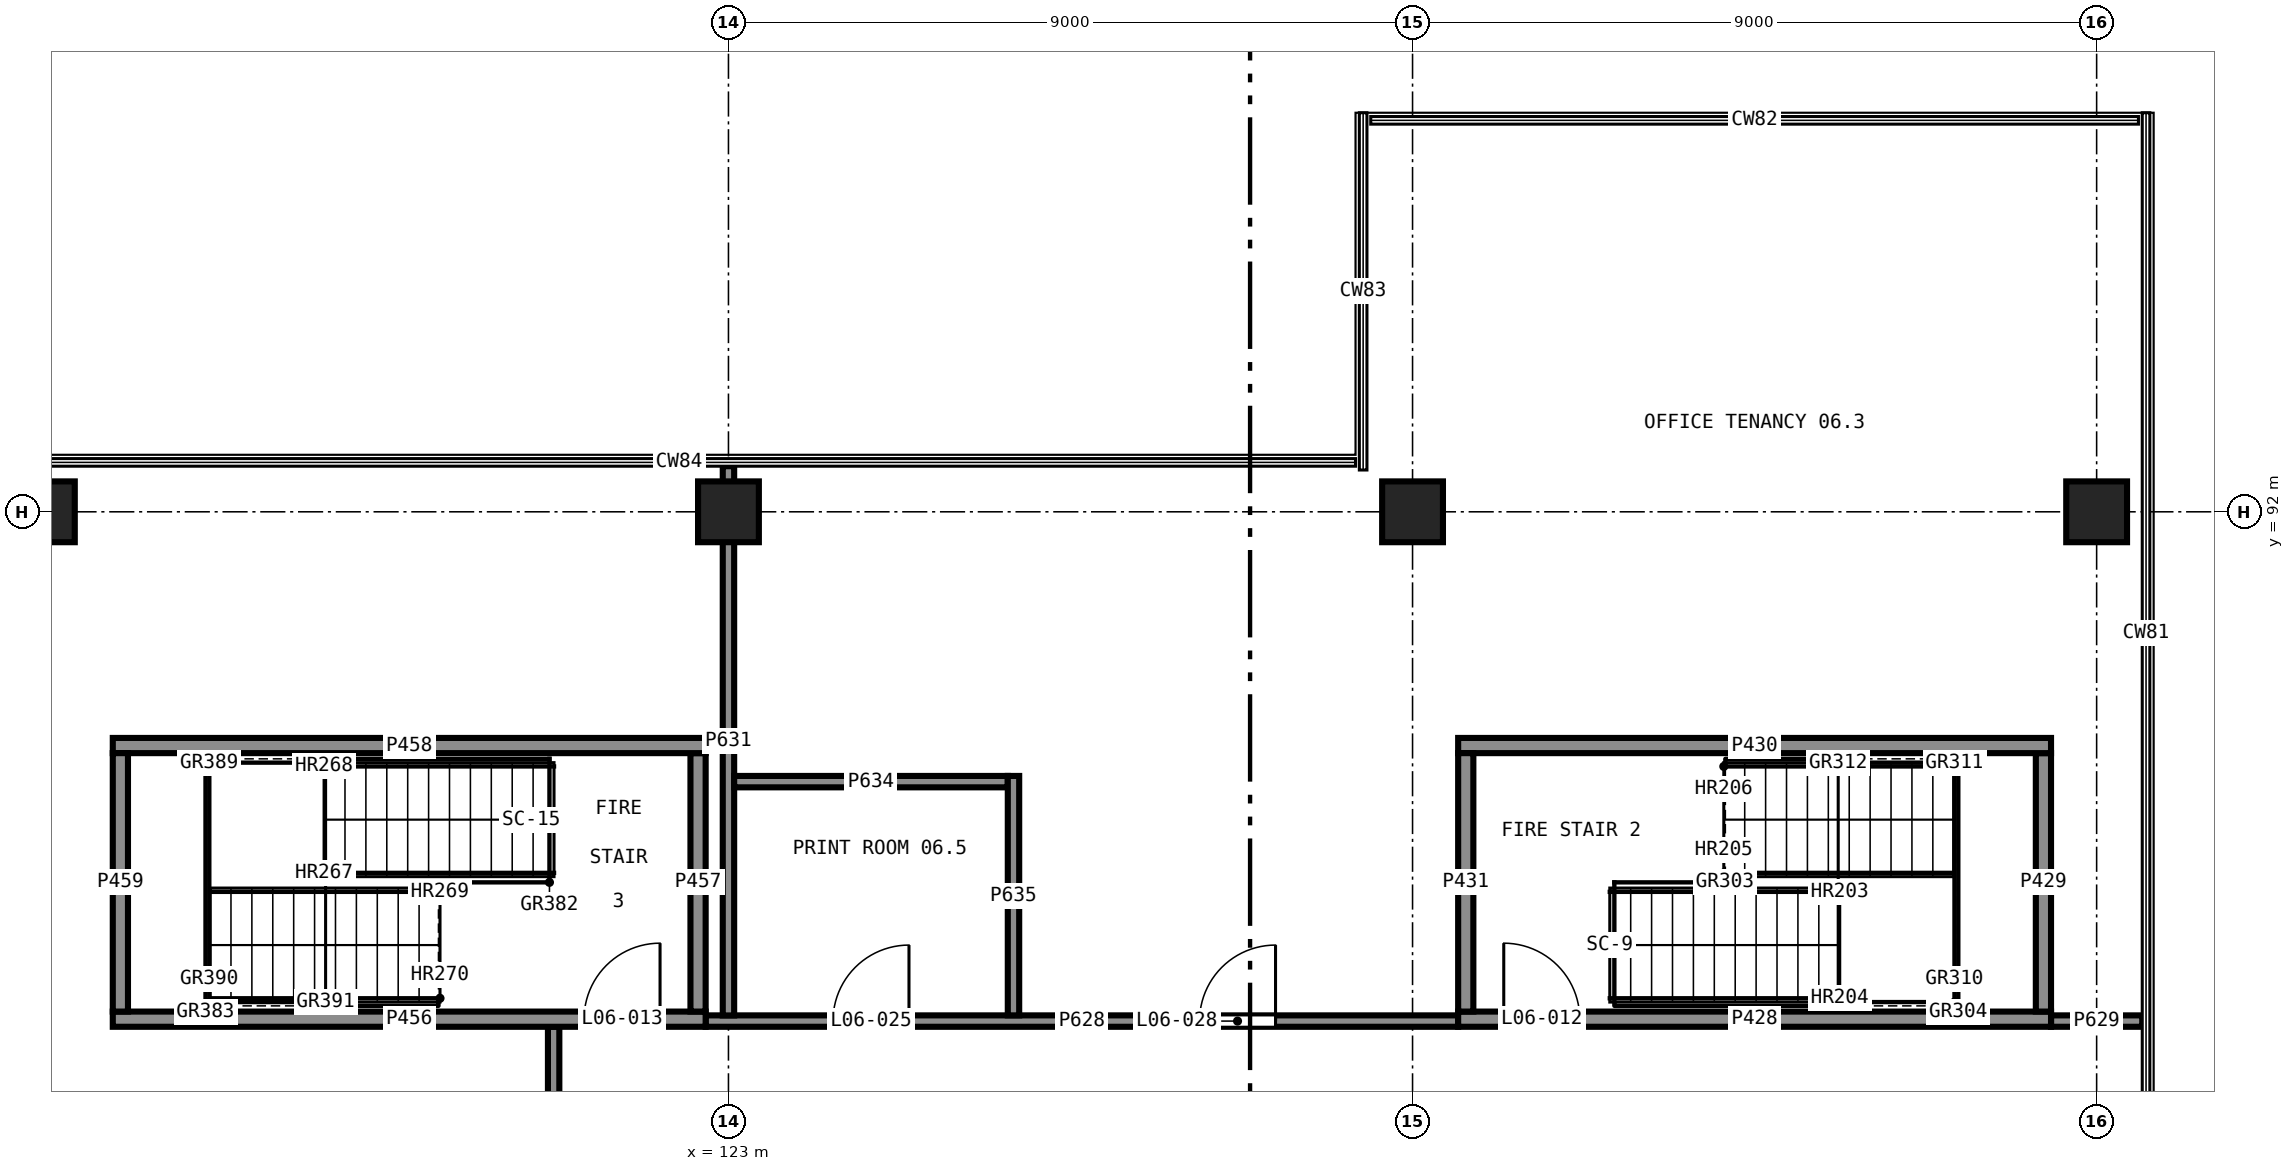
"""IFC4 building model, lengths in metres.
Left out: names, types, materials, properties, quantities, classifications, styles, units other than length and angle.
Written with IfcOpenShell. Run it as: python <this file> out.ifc"""

import sys

from ifc_helpers import new_model, si_unit, direction, frame, frame_2d, origin, origin_2d, place, context, subcontext, project, spatial, rectangle, extrude, element, fill, save


model = new_model("IFC4")
c1 = context("Model", 3, precision=1e-05, world=origin(), true_north=direction((0.0, 1.0)))
c2 = subcontext(c1, "Body", "Model", "MODEL_VIEW")
j1 = project(units=[si_unit("LENGTHUNIT", "METRE"), si_unit("PLANEANGLEUNIT", "RADIAN")], contexts=[c1])
p1 = place(None, origin())
s1 = spatial("IfcSite", under=j1, at=p1, CompositionType="ELEMENT")
p2 = place(p1, origin())
s2 = spatial("IfcBuilding", under=s1, at=p2, CompositionType="ELEMENT")
p3 = place(p2, frame((0.0, 0.0, 25.5)))
s3 = spatial("IfcBuildingStorey", under=s2, at=p3, CompositionType="ELEMENT", Elevation=25.5)
for number, where, z_axis, x_axis in (
    (1, (114.0, 92.0, 0.0), (0.0, 0.0, 1.0), (1.0, 0.0, 0.0)),
    (2, (123.0, 92.0, 0.0), (0.0, 0.0, 1.0), (1.0, 0.0, 0.0)),
    (3, (132.0, 92.0, 0.0), (0.0, 0.0, 1.0), (1.0, 0.0, 0.0)),
    (4, (141.0, 92.0, 0.0), (0.0, 0.0, 1.0), (1.0, 0.0, 0.0)),
):
    element("IfcColumn", number, at=place(p3, frame(where, z_axis=z_axis, x_axis=x_axis)), inside=s3, PredefinedType="COLUMN", context=c2, shape_type="SweptSolid", body=[
        extrude(rectangle(XDim=0.8, YDim=0.8, at=origin_2d()), origin(), (0.0, 0.0, 1.0), 4.0),
    ])
p4 = place(p3, frame((132.6, 85.325, 0.0), z_axis=(0.0, 0.0, 1.0), x_axis=(1.0, 0.0, 0.0)))
e5 = element("IfcWall", 5, at=p4, inside=s3, PredefinedType="SHEAR", context=c2, shape_type="SweptSolid", body=[
    extrude(rectangle(XDim=7.8, YDim=0.2, at=frame_2d((3.9, 0.0))), origin(), (0.0, 0.0, 1.0), 3.58),
])
p5 = place(p4, frame((0.6, 0.0, 0.0)))
e6 = element("IfcOpeningElement", 6, at=p5, cuts=e5, PredefinedType="OPENING", context=c2, shape_type="SweptSolid", body=[
    extrude(rectangle(XDim=1.0, YDim=2.1, at=frame_2d((0.5, 1.05))), frame((0.0, 0.11, 0.0), z_axis=(0.0, -1.0, 0.0), x_axis=(1.0, 0.0, 0.0)), (0.0, 0.0, 1.0), 0.22),
])
p6 = place(p3, frame((140.3, 85.425, 0.0), z_axis=(0.0, 0.0, 1.0), x_axis=(0.0, 1.0, 0.0)))
e7 = element("IfcWall", 7, at=p6, inside=s3, PredefinedType="SHEAR", context=c2, shape_type="SweptSolid", body=[
    extrude(rectangle(XDim=3.4, YDim=0.2, at=frame_2d((1.7, 0.0))), origin(), (0.0, 0.0, 1.0), 3.58),
])
p7 = place(p3, frame((140.4, 88.925, 0.0), z_axis=(0.0, 0.0, 1.0), x_axis=(-1.0, 0.0, 0.0)))
e8 = element("IfcWall", 8, at=p7, inside=s3, PredefinedType="SHEAR", context=c2, shape_type="SweptSolid", body=[
    extrude(rectangle(XDim=7.8, YDim=0.2, at=frame_2d((3.9, 0.0))), origin(), (0.0, 0.0, 1.0), 3.58),
])
p8 = place(p3, frame((132.7, 88.825, 0.0), z_axis=(0.0, 0.0, 1.0), x_axis=(0.0, -1.0, 0.0)))
e9 = element("IfcWall", 9, at=p8, inside=s3, PredefinedType="SHEAR", context=c2, shape_type="SweptSolid", body=[
    extrude(rectangle(XDim=3.4, YDim=0.2, at=frame_2d((1.7, 0.0))), origin(), (0.0, 0.0, 1.0), 3.58),
])
p9 = place(p3, frame((114.9, 85.325, 0.0), z_axis=(0.0, 0.0, 1.0), x_axis=(1.0, 0.0, 0.0)))
e10 = element("IfcWall", 10, at=p9, inside=s3, PredefinedType="SHEAR", context=c2, shape_type="SweptSolid", body=[
    extrude(rectangle(XDim=7.8, YDim=0.2, at=frame_2d((3.9, 0.0))), origin(), (0.0, 0.0, 1.0), 3.58),
])
p10 = place(p9, frame((6.2, 0.0, 0.0)))
e11 = element("IfcOpeningElement", 11, at=p10, cuts=e10, PredefinedType="OPENING", context=c2, shape_type="SweptSolid", body=[
    extrude(rectangle(XDim=1.0, YDim=2.1, at=frame_2d((0.5, 1.05))), frame((0.0, 0.11, 0.0), z_axis=(0.0, -1.0, 0.0), x_axis=(1.0, 0.0, 0.0)), (0.0, 0.0, 1.0), 0.22),
])
p11 = place(p3, frame((122.6, 85.425, 0.0), z_axis=(0.0, 0.0, 1.0), x_axis=(0.0, 1.0, 0.0)))
e12 = element("IfcWall", 12, at=p11, inside=s3, PredefinedType="SHEAR", context=c2, shape_type="SweptSolid", body=[
    extrude(rectangle(XDim=3.4, YDim=0.2, at=frame_2d((1.7, 0.0))), origin(), (0.0, 0.0, 1.0), 3.58),
])
p12 = place(p3, frame((122.7, 88.925, 0.0), z_axis=(0.0, 0.0, 1.0), x_axis=(-1.0, 0.0, 0.0)))
e13 = element("IfcWall", 13, at=p12, inside=s3, PredefinedType="SHEAR", context=c2, shape_type="SweptSolid", body=[
    extrude(rectangle(XDim=7.8, YDim=0.2, at=frame_2d((3.9, 0.0))), origin(), (0.0, 0.0, 1.0), 3.58),
])
p13 = place(p3, frame((115.0, 88.825, 0.0), z_axis=(0.0, 0.0, 1.0), x_axis=(0.0, -1.0, 0.0)))
e14 = element("IfcWall", 14, at=p13, inside=s3, PredefinedType="SHEAR", context=c2, shape_type="SweptSolid", body=[
    extrude(rectangle(XDim=3.4, YDim=0.2, at=frame_2d((1.7, 0.0))), origin(), (0.0, 0.0, 1.0), 3.58),
])
p14 = place(p3, frame((120.7, 62.7, 0.0), z_axis=(0.0, 0.0, 1.0), x_axis=(0.0, 1.0, 0.0)))
e15 = element("IfcWall", 15, at=p14, inside=s3, PredefinedType="PARTITIONING", context=c2, shape_type="SweptSolid", body=[
    extrude(rectangle(XDim=22.525, YDim=0.15, at=frame_2d((11.263, 0.0))), origin(), (0.0, 0.0, 1.0), 3.58),
])
p15 = place(p14, frame((10.748, 0.0, 0.0)))
e16 = element("IfcOpeningElement", 16, at=p15, cuts=e15, PredefinedType="OPENING", context=c2, shape_type="SweptSolid", body=[
    extrude(rectangle(XDim=1.0, YDim=2.1, at=frame_2d((0.5, 1.05))), frame((0.0, 0.085, 0.0), z_axis=(0.0, -1.0, 0.0), x_axis=(1.0, 0.0, 0.0)), (0.0, 0.0, 1.0), 0.17),
])
p16 = place(p3, frame((122.7, 85.3, 0.0), z_axis=(0.0, 0.0, 1.0), x_axis=(1.0, 0.0, 0.0)))
e17 = element("IfcWall", 17, at=p16, inside=s3, PredefinedType="PARTITIONING", context=c2, shape_type="SweptSolid", body=[
    extrude(rectangle(XDim=9.9, YDim=0.15, at=frame_2d((4.95, 0.0))), origin(), (0.0, 0.0, 1.0), 3.58),
])
p17 = place(p16, frame((1.675, 0.0, 0.0)))
e18 = element("IfcOpeningElement", 18, at=p17, cuts=e17, PredefinedType="OPENING", context=c2, shape_type="SweptSolid", body=[
    extrude(rectangle(XDim=1.0, YDim=2.1, at=frame_2d((0.5, 1.05))), frame((0.0, 0.085, 0.0), z_axis=(0.0, -1.0, 0.0), x_axis=(1.0, 0.0, 0.0)), (0.0, 0.0, 1.0), 0.17),
])
p18 = place(p16, frame((6.498, 0.0, 0.0)))
e19 = element("IfcOpeningElement", 19, at=p18, cuts=e17, PredefinedType="OPENING", context=c2, shape_type="SweptSolid", body=[
    extrude(rectangle(XDim=1.0, YDim=2.1, at=frame_2d((0.5, 1.05))), frame((0.0, 0.085, 0.0), z_axis=(0.0, -1.0, 0.0), x_axis=(1.0, 0.0, 0.0)), (0.0, 0.0, 1.0), 0.17),
])
p19 = place(p3, frame((140.4, 85.3, 0.0), z_axis=(0.0, 0.0, 1.0), x_axis=(1.0, 0.0, 0.0)))
e20 = element("IfcWall", 20, at=p19, inside=s3, PredefinedType="PARTITIONING", context=c2, shape_type="SweptSolid", body=[
    extrude(rectangle(XDim=1.2, YDim=0.15, at=frame_2d((0.6, 0.0))), origin(), (0.0, 0.0, 1.0), 3.58),
])
p20 = place(p3, frame((123.0, 85.374, 0.0), z_axis=(0.0, 0.0, 1.0), x_axis=(0.0, 1.0, 0.0)))
e21 = element("IfcWall", 21, at=p20, inside=s3, PredefinedType="PARTITIONING", context=c2, shape_type="SweptSolid", body=[
    extrude(rectangle(XDim=7.226, YDim=0.15, at=frame_2d((3.613, 0.0))), origin(), (0.0, 0.0, 1.0), 2.68),
])
p21 = place(p3, frame((123.075, 88.45, 0.0), z_axis=(0.0, 0.0, 1.0), x_axis=(1.0, 0.0, 0.0)))
e22 = element("IfcWall", 22, at=p21, inside=s3, PredefinedType="PARTITIONING", context=c2, shape_type="SweptSolid", body=[
    extrude(rectangle(XDim=3.6, YDim=0.15, at=frame_2d((1.8, 0.0))), origin(), (0.0, 0.0, 1.0), 3.58),
])
p22 = place(p3, frame((126.75, 85.375, 0.0), z_axis=(0.0, 0.0, 1.0), x_axis=(0.0, 1.0, 0.0)))
e23 = element("IfcWall", 23, at=p22, inside=s3, PredefinedType="PARTITIONING", context=c2, shape_type="SweptSolid", body=[
    extrude(rectangle(XDim=3.15, YDim=0.15, at=frame_2d((1.575, 0.0))), origin(), (0.0, 0.0, 1.0), 3.58),
])
p23 = place(p5, origin())
e24 = element("IfcDoor", 24, at=p23, inside=s3, OperationType="SINGLE_SWING_RIGHT", PredefinedType="DOOR", context=c2, shape_type="SweptSolid", body=[
    extrude(rectangle(XDim=1.0, YDim=2.1, at=frame_2d((0.5, 1.05))), frame((0.0, 0.025, 0.0), z_axis=(0.0, -1.0, 0.0), x_axis=(1.0, 0.0, 0.0)), (0.0, 0.0, 1.0), 0.05),
])
fill(e6, e24)
p24 = place(p10, origin())
e25 = element("IfcDoor", 25, at=p24, inside=s3, OperationType="SINGLE_SWING_LEFT", PredefinedType="DOOR", context=c2, shape_type="SweptSolid", body=[
    extrude(rectangle(XDim=1.0, YDim=2.1, at=frame_2d((0.5, 1.05))), frame((0.0, 0.025, 0.0), z_axis=(0.0, -1.0, 0.0), x_axis=(1.0, 0.0, 0.0)), (0.0, 0.0, 1.0), 0.05),
])
fill(e11, e25)
p25 = place(p17, origin())
e26 = element("IfcDoor", 26, at=p25, inside=s3, OperationType="SINGLE_SWING_LEFT", PredefinedType="DOOR", context=c2, shape_type="SweptSolid", body=[
    extrude(rectangle(XDim=1.0, YDim=2.1, at=frame_2d((0.5, 1.05))), frame((0.0, 0.025, 0.0), z_axis=(0.0, -1.0, 0.0), x_axis=(1.0, 0.0, 0.0)), (0.0, 0.0, 1.0), 0.05),
])
fill(e18, e26)
p26 = place(p18, origin())
e27 = element("IfcDoor", 27, at=p26, inside=s3, OperationType="SINGLE_SWING_LEFT", PredefinedType="DOOR", context=c2, shape_type="SweptSolid", body=[
    extrude(rectangle(XDim=1.0, YDim=2.1, at=frame_2d((0.5, 1.05))), frame((0.0, 0.025, 0.0), z_axis=(0.0, -1.0, 0.0), x_axis=(1.0, 0.0, 0.0)), (0.0, 0.0, 1.0), 0.05),
])
fill(e19, e27)
save(model, sys.argv[1])
